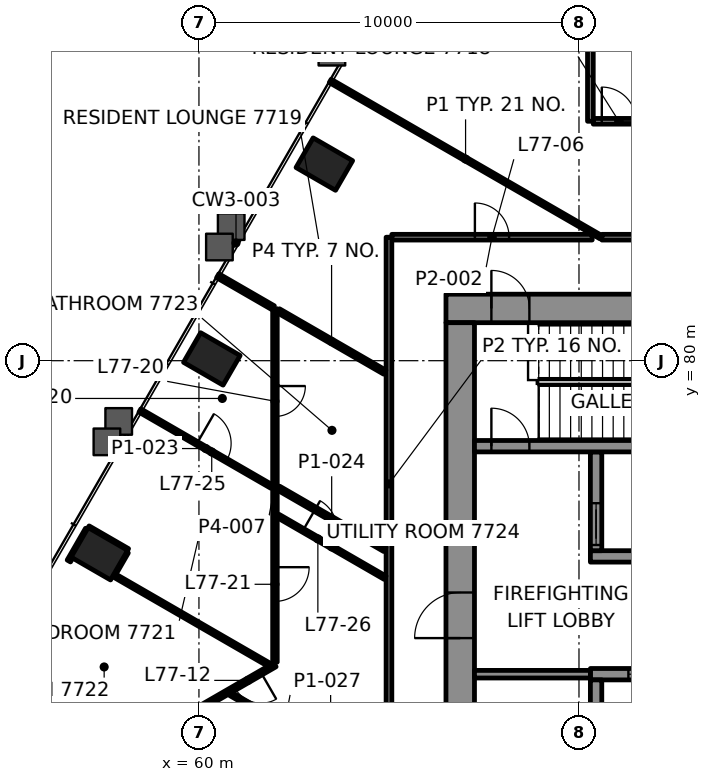
"""IFC4 building model, lengths in metres.
Left out: names, types, materials, properties, quantities, classifications, styles, units other than length and angle.
Written with IfcOpenShell. Run it as: python <this file> out.ifc"""

import sys

from ifc_helpers import new_model, si_unit, direction, frame, frame_2d, origin, origin_2d, place, context, subcontext, project, spatial, rectangle, hollow_rectangle, extrude, element, fill, save


model = new_model("IFC4")
c1 = context("Model", 3, precision=1e-05, world=origin(), true_north=direction((0.0, 1.0)))
c2 = subcontext(c1, "Body", "Model", "MODEL_VIEW")
j1 = project(units=[si_unit("LENGTHUNIT", "METRE"), si_unit("PLANEANGLEUNIT", "RADIAN")], contexts=[c1])
p1 = place(None, origin())
s1 = spatial("IfcSite", under=j1, at=p1, CompositionType="ELEMENT")
p2 = place(p1, origin())
s2 = spatial("IfcBuilding", under=s1, at=p2, CompositionType="ELEMENT")
p3 = place(p2, frame((0.0, 0.0, 316.1)))
s3 = spatial("IfcBuildingStorey", under=s2, at=p3, CompositionType="ELEMENT", Elevation=316.1)
for number, where, z_axis, x_axis in (
    (1, (63.299, 85.173, -0.0), (0.0, 0.0, 1.0), (-0.5, -0.866, 0.0)),
    (2, (60.339, 80.046, -0.0), (0.0, 0.0, 1.0), (-0.5, -0.866, 0.0)),
    (3, (57.379, 74.919, -0.0), (0.0, 0.0, 1.0), (-0.5, -0.866, 0.0)),
):
    element("IfcColumn", number, at=place(p3, frame(where, z_axis=z_axis, x_axis=x_axis)), inside=s3, PredefinedType="COLUMN", context=c2, shape_type="SweptSolid", body=[
        extrude(hollow_rectangle(XDim=0.9, YDim=1.2, WallThickness=0.06, at=origin_2d()), origin(), (0.0, 0.0, 1.0), 3.5),
    ])
p4 = place(p3, frame((66.5, 81.375, 0.0), z_axis=(0.0, 0.0, 1.0), x_axis=(1.0, 0.0, 0.0)))
e4 = element("IfcWall", 4, at=p4, inside=s3, PredefinedType="SHEAR", context=c2, shape_type="SweptSolid", body=[
    extrude(rectangle(XDim=17.0, YDim=0.75, at=frame_2d((8.5, 0.0))), origin(), (0.0, 0.0, 1.0), 3.3),
])
p5 = place(p4, frame((1.195, 0.0, 0.0)))
e5 = element("IfcOpeningElement", 5, at=p5, cuts=e4, PredefinedType="OPENING", context=c2, shape_type="SweptSolid", body=[
    extrude(rectangle(XDim=1.0, YDim=2.1, at=frame_2d((0.5, 1.05))), frame((0.0, 0.385, 0.0), z_axis=(0.0, -1.0, 0.0), x_axis=(1.0, 0.0, 0.0)), (0.0, 0.0, 1.0), 0.77),
])
p6 = place(p4, frame((15.005, 0.0, 0.0)))
e6 = element("IfcOpeningElement", 6, at=p6, cuts=e4, PredefinedType="OPENING", context=c2, shape_type="SweptSolid", body=[
    extrude(rectangle(XDim=1.0, YDim=2.1, at=frame_2d((0.5, 1.05))), frame((0.0, 0.385, 0.0), z_axis=(0.0, -1.0, 0.0), x_axis=(1.0, 0.0, 0.0)), (0.0, 0.0, 1.0), 0.77),
])
p7 = place(p4, frame((8.15, 0.0, 0.0)))
e7 = element("IfcOpeningElement", 7, at=p7, cuts=e4, PredefinedType="OPENING", context=c2, shape_type="SweptSolid", body=[
    extrude(rectangle(XDim=0.9, YDim=2.1, at=frame_2d((0.45, 1.05))), frame((0.0, 0.385, 0.0), z_axis=(0.0, -1.0, 0.0), x_axis=(1.0, 0.0, 0.0)), (0.0, 0.0, 1.0), 0.77),
])
p8 = place(p3, frame((66.875, 69.0, 0.0), z_axis=(0.0, 0.0, 1.0), x_axis=(0.0, 1.0, 0.0)))
e8 = element("IfcWall", 8, at=p8, inside=s3, PredefinedType="SHEAR", context=c2, shape_type="SweptSolid", body=[
    extrude(rectangle(XDim=12.0, YDim=0.75, at=frame_2d((6.0, 0.0))), origin(), (0.0, 0.0, 1.0), 3.3),
])
p9 = place(p8, frame((3.7, 0.0, 0.0)))
e9 = element("IfcOpeningElement", 9, at=p9, cuts=e8, PredefinedType="OPENING", context=c2, shape_type="SweptSolid", body=[
    extrude(rectangle(XDim=1.2, YDim=2.1, at=frame_2d((0.6, 1.05))), frame((0.0, 0.385, 0.0), z_axis=(0.0, -1.0, 0.0), x_axis=(1.0, 0.0, 0.0)), (0.0, 0.0, 1.0), 0.77),
])
p10 = place(p3, frame((70.3, 71.75, 0.0), z_axis=(0.0, 0.0, 1.0), x_axis=(1.0, 0.0, 0.0)))
e10 = element("IfcWall", 10, at=p10, inside=s3, PredefinedType="SHEAR", context=c2, shape_type="SweptSolid", body=[
    extrude(rectangle(XDim=11.5, YDim=0.3, at=frame_2d((5.75, 0.0))), origin(), (0.0, 0.0, 1.0), 3.3),
])
p11 = place(p10, frame((1.0, 0.0, 0.0)))
e11 = element("IfcOpeningElement", 11, at=p11, cuts=e10, PredefinedType="OPENING", context=c2, shape_type="SweptSolid", body=[
    extrude(rectangle(XDim=1.1, YDim=2.1, at=frame_2d((0.55, 1.05))), frame((0.0, 0.16, 0.0), z_axis=(0.0, -1.0, 0.0), x_axis=(1.0, 0.0, 0.0)), (0.0, 0.0, 1.0), 0.32),
])
p12 = place(p10, frame((3.8, 0.0, 0.0)))
e12 = element("IfcOpeningElement", 12, at=p12, cuts=e10, PredefinedType="OPENING", context=c2, shape_type="SweptSolid", body=[
    extrude(rectangle(XDim=1.1, YDim=2.1, at=frame_2d((0.55, 1.05))), frame((0.0, 0.16, 0.0), z_axis=(0.0, -1.0, 0.0), x_axis=(1.0, 0.0, 0.0)), (0.0, 0.0, 1.0), 0.32),
])
p13 = place(p10, frame((6.6, 0.0, 0.0)))
e13 = element("IfcOpeningElement", 13, at=p13, cuts=e10, PredefinedType="OPENING", context=c2, shape_type="SweptSolid", body=[
    extrude(rectangle(XDim=1.1, YDim=2.1, at=frame_2d((0.55, 1.05))), frame((0.0, 0.16, 0.0), z_axis=(0.0, -1.0, 0.0), x_axis=(1.0, 0.0, 0.0)), (0.0, 0.0, 1.0), 0.32),
])
p14 = place(p10, frame((9.4, 0.0, 0.0)))
e14 = element("IfcOpeningElement", 14, at=p14, cuts=e10, PredefinedType="OPENING", context=c2, shape_type="SweptSolid", body=[
    extrude(rectangle(XDim=1.1, YDim=2.1, at=frame_2d((0.55, 1.05))), frame((0.0, 0.16, 0.0), z_axis=(0.0, -1.0, 0.0), x_axis=(1.0, 0.0, 0.0)), (0.0, 0.0, 1.0), 0.32),
])
p15 = place(p3, frame((70.3, 74.85, 0.0), z_axis=(0.0, 0.0, 1.0), x_axis=(1.0, 0.0, 0.0)))
e15 = element("IfcWall", 15, at=p15, inside=s3, PredefinedType="SHEAR", context=c2, shape_type="SweptSolid", body=[
    extrude(rectangle(XDim=5.9, YDim=0.3, at=frame_2d((2.95, 0.0))), origin(), (0.0, 0.0, 1.0), 3.3),
])
p16 = place(p15, frame((3.8, 0.0, 0.0)))
e16 = element("IfcOpeningElement", 16, at=p16, cuts=e15, PredefinedType="OPENING", context=c2, shape_type="SweptSolid", body=[
    extrude(rectangle(XDim=1.1, YDim=2.1, at=frame_2d((0.55, 1.05))), frame((0.0, 0.16, 0.0), z_axis=(0.0, -1.0, 0.0), x_axis=(1.0, 0.0, 0.0)), (0.0, 0.0, 1.0), 0.32),
])
p17 = place(p3, frame((70.45, 69.0, 0.0), z_axis=(0.0, 0.0, 1.0), x_axis=(0.0, 1.0, 0.0)))
e17 = element("IfcWall", 17, at=p17, inside=s3, PredefinedType="SHEAR", context=c2, shape_type="SweptSolid", body=[
    extrude(rectangle(XDim=2.6, YDim=0.3, at=frame_2d((1.3, 0.0))), origin(), (0.0, 0.0, 1.0), 3.3),
])
p18 = place(p3, frame((70.45, 75.0, 0.0), z_axis=(0.0, 0.0, 1.0), x_axis=(0.0, 1.0, 0.0)))
e18 = element("IfcWall", 18, at=p18, inside=s3, PredefinedType="SHEAR", context=c2, shape_type="SweptSolid", body=[
    extrude(rectangle(XDim=2.6, YDim=0.3, at=frame_2d((1.3, 0.0))), origin(), (0.0, 0.0, 1.0), 3.3),
])
p19 = place(p18, frame((0.15, 0.0, 0.0)))
e19 = element("IfcOpeningElement", 19, at=p19, cuts=e18, PredefinedType="OPENING", context=c2, shape_type="SweptSolid", body=[
    extrude(rectangle(XDim=1.1, YDim=2.1, at=frame_2d((0.55, 1.05))), frame((0.0, 0.16, 0.0), z_axis=(0.0, -1.0, 0.0), x_axis=(1.0, 0.0, 0.0)), (0.0, 0.0, 1.0), 0.32),
])
p20 = place(p3, frame((67.25, 77.75, 0.0), z_axis=(0.0, 0.0, 1.0), x_axis=(1.0, 0.0, 0.0)))
e20 = element("IfcWall", 20, at=p20, inside=s3, PredefinedType="SHEAR", context=c2, shape_type="SweptSolid", body=[
    extrude(rectangle(XDim=15.5, YDim=0.3, at=frame_2d((7.75, 0.0))), origin(), (0.0, 0.0, 1.0), 3.3),
])
p21 = place(p20, frame((0.445, 0.0, 0.0)))
e21 = element("IfcOpeningElement", 21, at=p21, cuts=e20, PredefinedType="OPENING", context=c2, shape_type="SweptSolid", body=[
    extrude(rectangle(XDim=1.0, YDim=2.1, at=frame_2d((0.5, 1.05))), frame((0.0, 0.16, 0.0), z_axis=(0.0, -1.0, 0.0), x_axis=(1.0, 0.0, 0.0)), (0.0, 0.0, 1.0), 0.32),
])
p22 = place(p3, frame((65.075, 83.25, 0.0), z_axis=(0.0, 0.0, 1.0), x_axis=(1.0, 0.0, 0.0)))
e22 = element("IfcWall", 22, at=p22, inside=s3, PredefinedType="PARTITIONING", context=c2, shape_type="SweptSolid", body=[
    extrude(rectangle(XDim=5.271, YDim=0.15, at=frame_2d((2.636, 0.0))), origin(), (0.0, 0.0, 1.0), 2.7),
])
p23 = place(p22, frame((2.186, 0.0, 0.0)))
e23 = element("IfcOpeningElement", 23, at=p23, cuts=e22, PredefinedType="OPENING", context=c2, shape_type="SweptSolid", body=[
    extrude(rectangle(XDim=0.9, YDim=2.1, at=frame_2d((0.45, 1.05))), frame((0.0, 0.085, 0.0), z_axis=(0.0, -1.0, 0.0), x_axis=(1.0, 0.0, 0.0)), (0.0, 0.0, 1.0), 0.17),
])
p24 = place(p3, frame((70.375, 86.3, 0.0), z_axis=(0.0, 0.0, 1.0), x_axis=(1.0, 0.0, 0.0)))
e24 = element("IfcWall", 24, at=p24, inside=s3, PredefinedType="PARTITIONING", context=c2, shape_type="SweptSolid", body=[
    extrude(rectangle(XDim=1.349, YDim=0.15, at=frame_2d((0.675, 0.0))), origin(), (0.0, 0.0, 1.0), 2.7),
])
p25 = place(p24, frame((0.225, 0.0, 0.0)))
e25 = element("IfcOpeningElement", 25, at=p25, cuts=e24, PredefinedType="OPENING", context=c2, shape_type="SweptSolid", body=[
    extrude(rectangle(XDim=0.9, YDim=2.1, at=frame_2d((0.45, 1.05))), frame((0.0, 0.085, 0.0), z_axis=(0.0, -1.0, 0.0), x_axis=(1.0, 0.0, 0.0)), (0.0, 0.0, 1.0), 0.17),
])
p26 = place(p3, frame((62.0, 71.998, 0.0), z_axis=(0.0, 0.0, 1.0), x_axis=(-0.866023842607, -0.500002704028, 0.0)))
e26 = element("IfcWall", 26, at=p26, inside=s3, PredefinedType="PARTITIONING", context=c2, shape_type="SweptSolid", body=[
    extrude(rectangle(XDim=12.845, YDim=0.12, at=frame_2d((6.422, 0.0))), origin(), (0.0, 0.0, 1.0), 2.7),
])
p27 = place(p26, frame((0.421, 0.0, 0.0)))
e27 = element("IfcOpeningElement", 27, at=p27, cuts=e26, PredefinedType="OPENING", context=c2, shape_type="SweptSolid", body=[
    extrude(rectangle(XDim=0.8, YDim=2.1, at=frame_2d((0.4, 1.05))), frame((0.0, 0.07, 0.0), z_axis=(0.0, -1.0, 0.0), x_axis=(1.0, 0.0, 0.0)), (0.0, 0.0, 1.0), 0.14),
])
p28 = place(p26, frame((10.158, 0.0, 0.0)))
e28 = element("IfcOpeningElement", 28, at=p28, cuts=e26, PredefinedType="OPENING", context=c2, shape_type="SweptSolid", body=[
    extrude(rectangle(XDim=0.8, YDim=2.1, at=frame_2d((0.4, 1.05))), frame((0.0, 0.07, 0.0), z_axis=(0.0, -1.0, 0.0), x_axis=(1.0, 0.0, 0.0)), (0.0, 0.0, 1.0), 0.14),
])
p29 = place(p3, frame((57.776, 74.406, 0.0), z_axis=(0.0, 0.0, 1.0), x_axis=(0.500246099629, 0.865883271467, 0.0)))
e29 = element("IfcWall", 29, at=p29, inside=s3, PredefinedType="PARTITIONING", context=c2, shape_type="SweptSolid", body=[
    extrude(rectangle(XDim=0.646, YDim=0.1, at=frame_2d((0.323, 0.0))), origin(), (0.0, 0.0, 1.0), 2.7),
])
p30 = place(p3, frame((56.576, 74.729, 0.0), z_axis=(0.0, 0.0, 1.0), x_axis=(0.500079715141, 0.865979375335, 0.0)))
e30 = element("IfcWall", 30, at=p30, inside=s3, PredefinedType="PARTITIONING", context=c2, shape_type="SweptSolid", body=[
    extrude(rectangle(XDim=0.966, YDim=0.1, at=frame_2d((0.483, 0.0))), origin(), (0.0, 0.0, 1.0), 2.7),
])
p31 = place(p3, frame((70.3, 86.301, 0.0), z_axis=(0.0, 0.0, 1.0), x_axis=(0.0, 1.0, 0.0)))
e31 = element("IfcWall", 31, at=p31, inside=s3, PredefinedType="PARTITIONING", context=c2, shape_type="SweptSolid", body=[
    extrude(rectangle(XDim=9.799, YDim=0.15, at=frame_2d((4.899, 0.0))), origin(), (0.0, 0.0, 1.0), 2.7),
])
p32 = place(p3, frame((65.0, 70.266, 0.0), z_axis=(0.0, 0.0, 1.0), x_axis=(0.0, 1.0, 0.0)))
e32 = element("IfcWall", 32, at=p32, inside=s3, PredefinedType="PARTITIONING", context=c2, shape_type="SweptSolid", body=[
    extrude(rectangle(XDim=12.984, YDim=0.15, at=frame_2d((6.492, 0.0))), origin(), (0.0, 0.0, 1.0), 2.7),
])
p33 = place(p3, frame((62.0, 81.366, 0.0), z_axis=(0.0, 0.0, 1.0), x_axis=(0.0, -1.0, 0.0)))
e33 = element("IfcWall", 33, at=p33, inside=s3, PredefinedType="PARTITIONING", context=c2, shape_type="SweptSolid", body=[
    extrude(rectangle(XDim=9.299, YDim=0.12, at=frame_2d((4.649, 0.0))), origin(), (0.0, 0.0, 1.0), 2.7),
])
p34 = place(p33, frame((2.033, 0.0, 0.0)))
e34 = element("IfcOpeningElement", 34, at=p34, cuts=e33, PredefinedType="OPENING", context=c2, shape_type="SweptSolid", body=[
    extrude(rectangle(XDim=0.8, YDim=2.1, at=frame_2d((0.4, 1.05))), frame((0.0, 0.07, 0.0), z_axis=(0.0, -1.0, 0.0), x_axis=(1.0, 0.0, 0.0)), (0.0, 0.0, 1.0), 0.14),
])
p35 = place(p33, frame((6.8, 0.0, 0.0)))
e35 = element("IfcOpeningElement", 35, at=p35, cuts=e33, PredefinedType="OPENING", context=c2, shape_type="SweptSolid", body=[
    extrude(rectangle(XDim=0.9, YDim=2.1, at=frame_2d((0.45, 1.05))), frame((0.0, 0.07, 0.0), z_axis=(0.0, -1.0, 0.0), x_axis=(1.0, 0.0, 0.0)), (0.0, 0.0, 1.0), 0.14),
])
p36 = place(p3, frame((70.577, 83.25, 0.0), z_axis=(0.0, 0.0, 1.0), x_axis=(-0.866020477552, 0.500008532388, 0.0)))
e36 = element("IfcWall", 36, at=p36, inside=s3, PredefinedType="PARTITIONING", context=c2, shape_type="SweptSolid", body=[
    extrude(rectangle(XDim=8.224, YDim=0.1, at=frame_2d((4.112, 0.0))), origin(), (0.0, 0.0, 1.0), 2.688),
])
p37 = place(p3, frame((64.89, 79.697, 0.0), z_axis=(0.0, 0.0, 1.0), x_axis=(-0.866013313631, 0.500020940175, 0.0)))
e37 = element("IfcWall", 37, at=p37, inside=s3, PredefinedType="PARTITIONING", context=c2, shape_type="SweptSolid", body=[
    extrude(rectangle(XDim=3.233, YDim=0.12, at=frame_2d((1.617, 0.0))), origin(), (0.0, 0.0, 1.0), 2.7),
])
p38 = place(p3, frame((64.89, 75.031, 0.0), z_axis=(0.0, 0.0, 1.0), x_axis=(-0.866033195618, 0.499986503906, 0.0)))
e38 = element("IfcWall", 38, at=p38, inside=s3, PredefinedType="PARTITIONING", context=c2, shape_type="SweptSolid", body=[
    extrude(rectangle(XDim=3.228, YDim=0.12, at=frame_2d((1.614, 0.0))), origin(), (0.0, 0.0, 1.0), 2.7),
])
p39 = place(p3, frame((58.447, 78.689, 0.0), z_axis=(0.0, 0.0, 1.0), x_axis=(0.866035275801, -0.499982900776, 0.0)))
e39 = element("IfcWall", 39, at=p39, inside=s3, PredefinedType="PARTITIONING", context=c2, shape_type="SweptSolid", body=[
    extrude(rectangle(XDim=4.003, YDim=0.1, at=frame_2d((2.001, 0.0))), origin(), (0.0, 0.0, 1.0), 2.688),
])
p40 = place(p39, frame((1.732, 0.0, 0.0)))
e40 = element("IfcOpeningElement", 40, at=p40, cuts=e39, PredefinedType="OPENING", context=c2, shape_type="SweptSolid", body=[
    extrude(rectangle(XDim=0.9, YDim=2.1, at=frame_2d((0.45, 1.05))), frame((0.0, 0.06, 0.0), z_axis=(0.0, -1.0, 0.0), x_axis=(1.0, 0.0, 0.0)), (0.0, 0.0, 1.0), 0.12),
])
p41 = place(p3, frame((62.086, 75.912, 0.0), z_axis=(0.0, 0.0, 1.0), x_axis=(0.866032882975, -0.499987045439, 0.0)))
e41 = element("IfcWall", 41, at=p41, inside=s3, PredefinedType="PARTITIONING", context=c2, shape_type="SweptSolid", body=[
    extrude(rectangle(XDim=3.248, YDim=0.1, at=frame_2d((1.624, 0.0))), origin(), (0.0, 0.0, 1.0), 2.7),
])
p42 = place(p41, frame((0.754, 0.0, 0.0)))
e42 = element("IfcOpeningElement", 42, at=p42, cuts=e41, PredefinedType="OPENING", context=c2, shape_type="SweptSolid", body=[
    extrude(rectangle(XDim=0.9, YDim=2.1, at=frame_2d((0.45, 1.05))), frame((0.0, 0.06, 0.0), z_axis=(0.0, -1.0, 0.0), x_axis=(1.0, 0.0, 0.0)), (0.0, 0.0, 1.0), 0.12),
])
p43 = place(p3, frame((58.124, 75.01, 0.0), z_axis=(0.0, 0.0, 1.0), x_axis=(-0.865978732077, 0.500080829057, 0.0)))
e43 = element("IfcWall", 43, at=p43, inside=s3, PredefinedType="PARTITIONING", context=c2, shape_type="SweptSolid", body=[
    extrude(rectangle(XDim=1.199, YDim=0.1, at=frame_2d((0.6, 0.0))), origin(), (0.0, 0.0, 1.0), 2.688),
])
p44 = place(p3, frame((61.837, 72.003, 0.0), z_axis=(0.0, 0.0, 1.0), x_axis=(-0.86602790099, 0.499995674689, 0.0)))
e44 = element("IfcWall", 44, at=p44, inside=s3, PredefinedType="PARTITIONING", context=c2, shape_type="SweptSolid", body=[
    extrude(rectangle(XDim=4.718, YDim=0.1, at=frame_2d((2.359, 0.0))), origin(), (0.0, 0.0, 1.0), 2.7),
])
p45 = place(p3, frame((63.652, 69.604, 0.0), z_axis=(0.0, 0.0, 1.0), x_axis=(-0.866032882975, 0.499987045439, 0.0)))
e45 = element("IfcWall", 45, at=p45, inside=s3, PredefinedType="PARTITIONING", context=c2, shape_type="SweptSolid", body=[
    extrude(rectangle(XDim=3.248, YDim=0.1, at=frame_2d((1.624, 0.0))), origin(), (0.0, 0.0, 1.0), 2.7),
])
p46 = place(p45, frame((1.174, 0.0, 0.0)))
e46 = element("IfcOpeningElement", 46, at=p46, cuts=e45, PredefinedType="OPENING", context=c2, shape_type="SweptSolid", body=[
    extrude(rectangle(XDim=0.9, YDim=2.1, at=frame_2d((0.45, 1.05))), frame((0.0, 0.06, 0.0), z_axis=(0.0, -1.0, 0.0), x_axis=(1.0, 0.0, 0.0)), (0.0, 0.0, 1.0), 0.12),
])
p47 = place(p3, frame((70.602, 83.25, 0.0), z_axis=(0.0, 0.0, 1.0), x_axis=(1.0, 0.0, 0.0)))
e47 = element("IfcWall", 47, at=p47, inside=s3, PredefinedType="PARTITIONING", context=c2, shape_type="SweptSolid", body=[
    extrude(rectangle(XDim=1.198, YDim=0.15, at=frame_2d((0.599, 0.0))), origin(), (0.0, 0.0, 1.0), 2.7),
])
p48 = place(p3, frame((61.955, 81.392, 0.0), z_axis=(0.0, 0.0, 1.0), x_axis=(-0.866033677446, 0.499985669323, 0.0)))
e48 = element("IfcWall", 48, at=p48, inside=s3, PredefinedType="PARTITIONING", context=c2, shape_type="SweptSolid", body=[
    extrude(rectangle(XDim=1.686, YDim=0.12, at=frame_2d((0.843, 0.0))), origin(), (0.0, 0.0, 1.0), 2.688),
])
p49 = place(p3, frame((67.25, 71.75, 0.0), z_axis=(0.0, 0.0, 1.0), x_axis=(1.0, 0.0, 0.0)))
e49 = element("IfcWall", 49, at=p49, inside=s3, PredefinedType="PARTITIONING", context=c2, shape_type="SweptSolid", body=[
    extrude(rectangle(XDim=3.05, YDim=0.2, at=frame_2d((1.525, 0.0))), origin(), (0.0, 0.0, 1.0), 3.3),
])
p50 = place(p23, origin())
e50 = element("IfcDoor", 50, at=p50, inside=s3, OperationType="SINGLE_SWING_RIGHT", PredefinedType="DOOR", context=c2, shape_type="SweptSolid", body=[
    extrude(rectangle(XDim=0.9, YDim=2.1, at=frame_2d((0.45, 1.05))), frame((0.0, 0.025, 0.0), z_axis=(0.0, -1.0, 0.0), x_axis=(1.0, 0.0, 0.0)), (0.0, 0.0, 1.0), 0.05),
])
fill(e23, e50)
p51 = place(p25, origin())
e51 = element("IfcDoor", 51, at=p51, inside=s3, OperationType="SINGLE_SWING_LEFT", PredefinedType="DOOR", context=c2, shape_type="SweptSolid", body=[
    extrude(rectangle(XDim=0.9, YDim=2.1, at=frame_2d((0.45, 1.05))), frame((0.0, 0.025, 0.0), z_axis=(0.0, -1.0, 0.0), x_axis=(1.0, 0.0, 0.0)), (0.0, 0.0, 1.0), 0.05),
])
fill(e25, e51)
p52 = place(p27, origin())
e52 = element("IfcDoor", 52, at=p52, inside=s3, OperationType="SINGLE_SWING_RIGHT", PredefinedType="DOOR", context=c2, shape_type="SweptSolid", body=[
    extrude(rectangle(XDim=0.8, YDim=2.1, at=frame_2d((0.4, 1.05))), frame((0.0, 0.025, 0.0), z_axis=(0.0, -1.0, 0.0), x_axis=(1.0, 0.0, 0.0)), (0.0, 0.0, 1.0), 0.05),
])
fill(e27, e52)
p53 = place(p34, origin())
e53 = element("IfcDoor", 53, at=p53, inside=s3, OperationType="SINGLE_SWING_RIGHT", PredefinedType="DOOR", context=c2, shape_type="SweptSolid", body=[
    extrude(rectangle(XDim=0.8, YDim=2.1, at=frame_2d((0.4, 1.05))), frame((0.0, 0.025, 0.0), z_axis=(0.0, -1.0, 0.0), x_axis=(1.0, 0.0, 0.0)), (0.0, 0.0, 1.0), 0.05),
])
fill(e34, e53)
p54 = place(p35, origin())
e54 = element("IfcDoor", 54, at=p54, inside=s3, OperationType="SINGLE_SWING_RIGHT", PredefinedType="DOOR", context=c2, shape_type="SweptSolid", body=[
    extrude(rectangle(XDim=0.9, YDim=2.1, at=frame_2d((0.45, 1.05))), frame((0.0, 0.025, 0.0), z_axis=(0.0, -1.0, 0.0), x_axis=(1.0, 0.0, 0.0)), (0.0, 0.0, 1.0), 0.05),
])
fill(e35, e54)
p55 = place(p40, origin())
e55 = element("IfcDoor", 55, at=p55, inside=s3, OperationType="SINGLE_SWING_LEFT", PredefinedType="DOOR", context=c2, shape_type="SweptSolid", body=[
    extrude(rectangle(XDim=0.9, YDim=2.1, at=frame_2d((0.45, 1.05))), frame((0.0, 0.025, 0.0), z_axis=(0.0, -1.0, 0.0), x_axis=(1.0, 0.0, 0.0)), (0.0, 0.0, 1.0), 0.05),
])
fill(e40, e55)
p56 = place(p42, origin())
e56 = element("IfcDoor", 56, at=p56, inside=s3, OperationType="SINGLE_SWING_LEFT", PredefinedType="DOOR", context=c2, shape_type="SweptSolid", body=[
    extrude(rectangle(XDim=0.9, YDim=2.1, at=frame_2d((0.45, 1.05))), frame((0.0, 0.025, 0.0), z_axis=(0.0, -1.0, 0.0), x_axis=(1.0, 0.0, 0.0)), (0.0, 0.0, 1.0), 0.05),
])
fill(e42, e56)
p57 = place(p11, origin())
e57 = element("IfcDoor", 57, at=p57, inside=s3, OperationType="DOUBLE_DOOR_SLIDING", PredefinedType="DOOR", context=c2, shape_type="SweptSolid", body=[
    extrude(rectangle(XDim=1.1, YDim=2.1, at=frame_2d((0.55, 1.05))), frame((0.0, 0.025, 0.0), z_axis=(0.0, -1.0, 0.0), x_axis=(1.0, 0.0, 0.0)), (0.0, 0.0, 1.0), 0.05),
])
fill(e11, e57)
p58 = place(p19, origin())
e58 = element("IfcDoor", 58, at=p58, inside=s3, OperationType="DOUBLE_DOOR_SLIDING", PredefinedType="DOOR", context=c2, shape_type="SweptSolid", body=[
    extrude(rectangle(XDim=1.1, YDim=2.1, at=frame_2d((0.55, 1.05))), frame((0.0, 0.025, 0.0), z_axis=(0.0, -1.0, 0.0), x_axis=(1.0, 0.0, 0.0)), (0.0, 0.0, 1.0), 0.05),
])
fill(e19, e58)
p59 = place(p21, origin())
e59 = element("IfcDoor", 59, at=p59, inside=s3, OperationType="SINGLE_SWING_LEFT", PredefinedType="DOOR", context=c2, shape_type="SweptSolid", body=[
    extrude(rectangle(XDim=1.0, YDim=2.1, at=frame_2d((0.5, 1.05))), frame((0.0, 0.025, 0.0), z_axis=(0.0, -1.0, 0.0), x_axis=(1.0, 0.0, 0.0)), (0.0, 0.0, 1.0), 0.05),
])
fill(e21, e59)
p60 = place(p5, origin())
e60 = element("IfcDoor", 60, at=p60, inside=s3, OperationType="SINGLE_SWING_RIGHT", PredefinedType="DOOR", context=c2, shape_type="SweptSolid", body=[
    extrude(rectangle(XDim=1.0, YDim=2.1, at=frame_2d((0.5, 1.05))), frame((0.0, 0.095, 0.0), z_axis=(0.0, -1.0, 0.0), x_axis=(1.0, 0.0, 0.0)), (0.0, 0.0, 1.0), 0.19),
])
fill(e5, e60)
p61 = place(p9, origin())
e61 = element("IfcDoor", 61, at=p61, inside=s3, OperationType="SINGLE_SWING_RIGHT", PredefinedType="DOOR", context=c2, shape_type="SweptSolid", body=[
    extrude(rectangle(XDim=1.2, YDim=2.1, at=frame_2d((0.6, 1.05))), frame((0.0, 0.095, 0.0), z_axis=(0.0, -1.0, 0.0), x_axis=(1.0, 0.0, 0.0)), (0.0, 0.0, 1.0), 0.19),
])
fill(e9, e61)
save(model, sys.argv[1])
